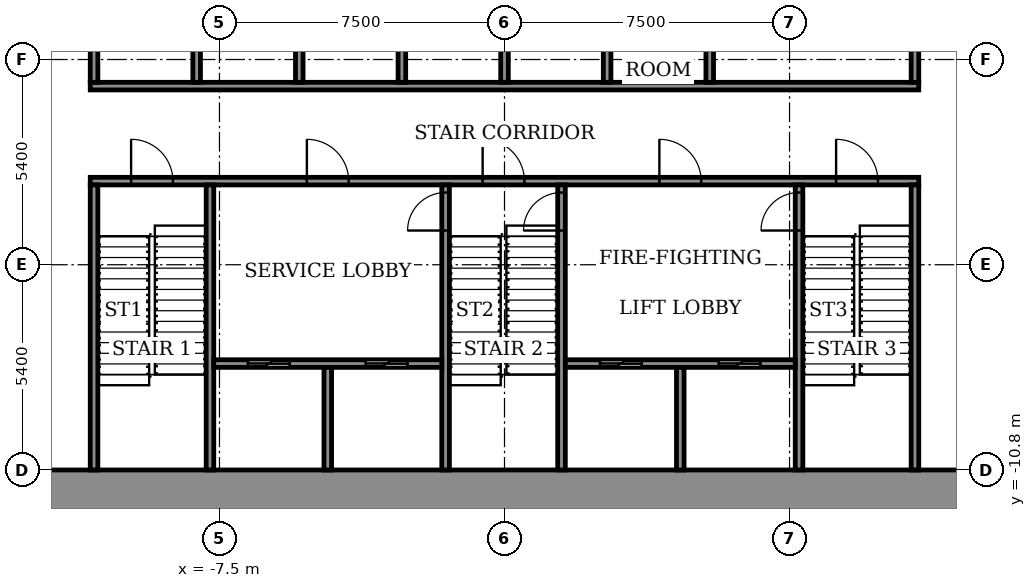
"""IFC4 building model, lengths in metres.
Left out: names, types, materials, properties, quantities, classifications, styles, units other than length and angle.
Written with IfcOpenShell. Run it as: python <this file> out.ifc"""

import sys

from ifc_helpers import new_model, si_unit, direction, frame, frame_2d, origin, place, context, subcontext, project, spatial, rectangle, extrude, element, fill, save


model = new_model("IFC4")
c1 = context("Model", 3, precision=1e-05, world=origin(), true_north=direction((0.0, 1.0)))
c2 = subcontext(c1, "Body", "Model", "MODEL_VIEW")
j1 = project(units=[si_unit("LENGTHUNIT", "METRE"), si_unit("PLANEANGLEUNIT", "RADIAN")], contexts=[c1])
p1 = place(None, origin())
s1 = spatial("IfcSite", under=j1, at=p1, CompositionType="ELEMENT")
p2 = place(p1, origin())
s2 = spatial("IfcBuilding", under=s1, at=p2, CompositionType="ELEMENT")
p3 = place(p2, frame((0.0, 0.0, 6.0)))
s3 = spatial("IfcBuildingStorey", under=s2, at=p3, CompositionType="ELEMENT", Elevation=6.0)
p4 = place(p3, frame((-15.0, -11.4, 0.0), z_axis=(0.0, 0.0, 1.0), x_axis=(1.0, 0.0, 0.0)))
e1 = element("IfcWall", 1, at=p4, inside=s3, PredefinedType="SHEAR", context=c2, shape_type="SweptSolid", body=[
    extrude(rectangle(XDim=30.0, YDim=1.2, at=frame_2d((15.0, 0.0))), origin(), (0.0, 0.0, 1.0), 5.0),
])
p5 = place(p3, frame((-10.9, -3.2, 0.0), z_axis=(0.0, 0.0, 1.0), x_axis=(1.0, 0.0, 0.0)))
e2 = element("IfcWall", 2, at=p5, inside=s3, PredefinedType="SHEAR", context=c2, shape_type="SweptSolid", body=[
    extrude(rectangle(XDim=21.8, YDim=0.2, at=frame_2d((10.9, 0.0))), origin(), (0.0, 0.0, 1.0), 4.45),
])
p6 = place(p5, frame((1.075, 0.0, 0.0)))
e3 = element("IfcOpeningElement", 3, at=p6, cuts=e2, PredefinedType="OPENING", context=c2, shape_type="SweptSolid", body=[
    extrude(rectangle(XDim=1.1, YDim=2.1, at=frame_2d((0.55, 1.05))), frame((0.0, 0.11, 0.0), z_axis=(0.0, -1.0, 0.0), x_axis=(1.0, 0.0, 0.0)), (0.0, 0.0, 1.0), 0.22),
])
p7 = place(p5, frame((10.325, 0.0, 0.0)))
e4 = element("IfcOpeningElement", 4, at=p7, cuts=e2, PredefinedType="OPENING", context=c2, shape_type="SweptSolid", body=[
    extrude(rectangle(XDim=1.1, YDim=2.1, at=frame_2d((0.55, 1.05))), frame((0.0, 0.11, 0.0), z_axis=(0.0, -1.0, 0.0), x_axis=(1.0, 0.0, 0.0)), (0.0, 0.0, 1.0), 0.22),
])
p8 = place(p5, frame((19.625, 0.0, 0.0)))
e5 = element("IfcOpeningElement", 5, at=p8, cuts=e2, PredefinedType="OPENING", context=c2, shape_type="SweptSolid", body=[
    extrude(rectangle(XDim=1.1, YDim=2.1, at=frame_2d((0.55, 1.05))), frame((0.0, 0.11, 0.0), z_axis=(0.0, -1.0, 0.0), x_axis=(1.0, 0.0, 0.0)), (0.0, 0.0, 1.0), 0.22),
])
p9 = place(p5, frame((5.7, 0.0, 0.0)))
e6 = element("IfcOpeningElement", 6, at=p9, cuts=e2, PredefinedType="OPENING", context=c2, shape_type="SweptSolid", body=[
    extrude(rectangle(XDim=1.1, YDim=2.1, at=frame_2d((0.55, 1.05))), frame((0.0, 0.11, 0.0), z_axis=(0.0, -1.0, 0.0), x_axis=(1.0, 0.0, 0.0)), (0.0, 0.0, 1.0), 0.22),
])
p10 = place(p5, frame((14.975, 0.0, 0.0)))
e7 = element("IfcOpeningElement", 7, at=p10, cuts=e2, PredefinedType="OPENING", context=c2, shape_type="SweptSolid", body=[
    extrude(rectangle(XDim=1.1, YDim=2.1, at=frame_2d((0.55, 1.05))), frame((0.0, 0.11, 0.0), z_axis=(0.0, -1.0, 0.0), x_axis=(1.0, 0.0, 0.0)), (0.0, 0.0, 1.0), 0.22),
])
p11 = place(p3, frame((-10.9, -0.7, 0.0), z_axis=(0.0, 0.0, 1.0), x_axis=(1.0, 0.0, 0.0)))
e8 = element("IfcWall", 8, at=p11, inside=s3, PredefinedType="SHEAR", context=c2, shape_type="SweptSolid", body=[
    extrude(rectangle(XDim=21.8, YDim=0.2, at=frame_2d((10.9, 0.0))), origin(), (0.0, 0.0, 1.0), 4.45),
])
for number, where, z_axis, x_axis in (
    (9, (-10.8, -10.8, 0.0), (0.0, 0.0, 1.0), (0.0, 1.0, 0.0)),
    (10, (-7.75, -10.8, 0.0), (0.0, 0.0, 1.0), (0.0, 1.0, 0.0)),
):
    element("IfcWall", number, at=place(p3, frame(where, z_axis=z_axis, x_axis=x_axis)), inside=s3, PredefinedType="SHEAR", context=c2, shape_type="SweptSolid", body=[
        extrude(rectangle(XDim=7.5, YDim=0.2, at=frame_2d((3.75, 0.0))), origin(), (0.0, 0.0, 1.0), 4.45),
    ])
p12 = place(p3, frame((-1.55, -10.8, 0.0), z_axis=(0.0, 0.0, 1.0), x_axis=(0.0, 1.0, 0.0)))
e11 = element("IfcWall", 11, at=p12, inside=s3, PredefinedType="SHEAR", context=c2, shape_type="SweptSolid", body=[
    extrude(rectangle(XDim=7.5, YDim=0.2, at=frame_2d((3.75, 0.0))), origin(), (0.0, 0.0, 1.0), 4.45),
])
p13 = place(p12, frame((6.3, 0.0, 0.0)))
e12 = element("IfcOpeningElement", 12, at=p13, cuts=e11, PredefinedType="OPENING", context=c2, shape_type="SweptSolid", body=[
    extrude(rectangle(XDim=1.0, YDim=2.1, at=frame_2d((0.5, 1.05))), frame((0.0, 0.11, 0.0), z_axis=(0.0, -1.0, 0.0), x_axis=(1.0, 0.0, 0.0)), (0.0, 0.0, 1.0), 0.22),
])
p14 = place(p3, frame((1.5, -10.8, 0.0), z_axis=(0.0, 0.0, 1.0), x_axis=(0.0, 1.0, 0.0)))
e13 = element("IfcWall", 13, at=p14, inside=s3, PredefinedType="SHEAR", context=c2, shape_type="SweptSolid", body=[
    extrude(rectangle(XDim=7.5, YDim=0.2, at=frame_2d((3.75, 0.0))), origin(), (0.0, 0.0, 1.0), 4.45),
])
p15 = place(p14, frame((6.3, 0.0, 0.0)))
e14 = element("IfcOpeningElement", 14, at=p15, cuts=e13, PredefinedType="OPENING", context=c2, shape_type="SweptSolid", body=[
    extrude(rectangle(XDim=1.0, YDim=2.1, at=frame_2d((0.5, 1.05))), frame((0.0, 0.11, 0.0), z_axis=(0.0, -1.0, 0.0), x_axis=(1.0, 0.0, 0.0)), (0.0, 0.0, 1.0), 0.22),
])
p16 = place(p3, frame((7.75, -10.8, 0.0), z_axis=(0.0, 0.0, 1.0), x_axis=(0.0, 1.0, 0.0)))
e15 = element("IfcWall", 15, at=p16, inside=s3, PredefinedType="SHEAR", context=c2, shape_type="SweptSolid", body=[
    extrude(rectangle(XDim=7.5, YDim=0.2, at=frame_2d((3.75, 0.0))), origin(), (0.0, 0.0, 1.0), 4.45),
])
p17 = place(p16, frame((6.3, 0.0, 0.0)))
e16 = element("IfcOpeningElement", 16, at=p17, cuts=e15, PredefinedType="OPENING", context=c2, shape_type="SweptSolid", body=[
    extrude(rectangle(XDim=1.0, YDim=2.1, at=frame_2d((0.5, 1.05))), frame((0.0, 0.11, 0.0), z_axis=(0.0, -1.0, 0.0), x_axis=(1.0, 0.0, 0.0)), (0.0, 0.0, 1.0), 0.22),
])
p18 = place(p3, frame((10.8, -10.8, 0.0), z_axis=(0.0, 0.0, 1.0), x_axis=(0.0, 1.0, 0.0)))
e17 = element("IfcWall", 17, at=p18, inside=s3, PredefinedType="SHEAR", context=c2, shape_type="SweptSolid", body=[
    extrude(rectangle(XDim=7.5, YDim=0.2, at=frame_2d((3.75, 0.0))), origin(), (0.0, 0.0, 1.0), 4.45),
])
p19 = place(p3, frame((-7.65, -8.0, 0.0), z_axis=(0.0, 0.0, 1.0), x_axis=(1.0, 0.0, 0.0)))
e18 = element("IfcWall", 18, at=p19, inside=s3, PredefinedType="SHEAR", context=c2, shape_type="SweptSolid", body=[
    extrude(rectangle(XDim=6.0, YDim=0.2, at=frame_2d((3.0, 0.0))), origin(), (0.0, 0.0, 1.0), 4.45),
])
p20 = place(p19, frame((0.9, 0.0, 0.0)))
e19 = element("IfcOpeningElement", 19, at=p20, cuts=e18, PredefinedType="OPENING", context=c2, shape_type="SweptSolid", body=[
    extrude(rectangle(XDim=1.1, YDim=2.1, at=frame_2d((0.55, 1.05))), frame((0.0, 0.11, 0.0), z_axis=(0.0, -1.0, 0.0), x_axis=(1.0, 0.0, 0.0)), (0.0, 0.0, 1.0), 0.22),
])
p21 = place(p19, frame((4.0, 0.0, 0.0)))
e20 = element("IfcOpeningElement", 20, at=p21, cuts=e18, PredefinedType="OPENING", context=c2, shape_type="SweptSolid", body=[
    extrude(rectangle(XDim=1.1, YDim=2.1, at=frame_2d((0.55, 1.05))), frame((0.0, 0.11, 0.0), z_axis=(0.0, -1.0, 0.0), x_axis=(1.0, 0.0, 0.0)), (0.0, 0.0, 1.0), 0.22),
])
p22 = place(p3, frame((-4.65, -10.8, 0.0), z_axis=(0.0, 0.0, 1.0), x_axis=(0.0, 1.0, 0.0)))
e21 = element("IfcWall", 21, at=p22, inside=s3, PredefinedType="SHEAR", context=c2, shape_type="SweptSolid", body=[
    extrude(rectangle(XDim=2.7, YDim=0.2, at=frame_2d((1.35, 0.0))), origin(), (0.0, 0.0, 1.0), 4.45),
])
p23 = place(p3, frame((1.6, -8.0, 0.0), z_axis=(0.0, 0.0, 1.0), x_axis=(1.0, 0.0, 0.0)))
e22 = element("IfcWall", 22, at=p23, inside=s3, PredefinedType="SHEAR", context=c2, shape_type="SweptSolid", body=[
    extrude(rectangle(XDim=6.05, YDim=0.2, at=frame_2d((3.025, 0.0))), origin(), (0.0, 0.0, 1.0), 4.45),
])
p24 = place(p23, frame((0.913, 0.0, 0.0)))
e23 = element("IfcOpeningElement", 23, at=p24, cuts=e22, PredefinedType="OPENING", context=c2, shape_type="SweptSolid", body=[
    extrude(rectangle(XDim=1.1, YDim=2.1, at=frame_2d((0.55, 1.05))), frame((0.0, 0.11, 0.0), z_axis=(0.0, -1.0, 0.0), x_axis=(1.0, 0.0, 0.0)), (0.0, 0.0, 1.0), 0.22),
])
p25 = place(p23, frame((4.038, 0.0, 0.0)))
e24 = element("IfcOpeningElement", 24, at=p25, cuts=e22, PredefinedType="OPENING", context=c2, shape_type="SweptSolid", body=[
    extrude(rectangle(XDim=1.1, YDim=2.1, at=frame_2d((0.55, 1.05))), frame((0.0, 0.11, 0.0), z_axis=(0.0, -1.0, 0.0), x_axis=(1.0, 0.0, 0.0)), (0.0, 0.0, 1.0), 0.22),
])
p26 = place(p3, frame((4.625, -10.8, 0.0), z_axis=(0.0, 0.0, 1.0), x_axis=(0.0, 1.0, 0.0)))
e25 = element("IfcWall", 25, at=p26, inside=s3, PredefinedType="SHEAR", context=c2, shape_type="SweptSolid", body=[
    extrude(rectangle(XDim=2.7, YDim=0.2, at=frame_2d((1.35, 0.0))), origin(), (0.0, 0.0, 1.0), 4.45),
])
for number, where, z_axis, x_axis in (
    (26, (-10.8, -0.6, 0.0), (0.0, 0.0, 1.0), (0.0, 1.0, 0.0)),
    (27, (-8.1, -0.6, 0.0), (0.0, 0.0, 1.0), (0.0, 1.0, 0.0)),
    (28, (-5.4, -0.6, 0.0), (0.0, 0.0, 1.0), (0.0, 1.0, 0.0)),
    (29, (-2.7, -0.6, 0.0), (0.0, 0.0, 1.0), (0.0, 1.0, 0.0)),
    (30, (0.0, -0.6, 0.0), (0.0, 0.0, 1.0), (0.0, 1.0, 0.0)),
    (31, (2.7, -0.6, 0.0), (0.0, 0.0, 1.0), (0.0, 1.0, 0.0)),
):
    element("IfcWall", number, at=place(p3, frame(where, z_axis=z_axis, x_axis=x_axis)), inside=s3, PredefinedType="SHEAR", context=c2, shape_type="SweptSolid", body=[
        extrude(rectangle(XDim=2.5, YDim=0.2, at=frame_2d((1.25, 0.0))), origin(), (0.0, 0.0, 1.0), 4.45),
    ])
for number, where, z_axis, x_axis in (
    (32, (5.4, -0.6, 0.0), (0.0, 0.0, 1.0), (0.0, 1.0, 0.0)),
    (33, (10.8, -0.6, 0.0), (0.0, 0.0, 1.0), (0.0, 1.0, 0.0)),
):
    element("IfcWall", number, at=place(p3, frame(where, z_axis=z_axis, x_axis=x_axis)), inside=s3, PredefinedType="STANDARD", context=c2, shape_type="SweptSolid", body=[
        extrude(rectangle(XDim=2.5, YDim=0.2, at=frame_2d((1.25, 0.0))), origin(), (0.0, 0.0, 1.0), 4.45),
    ])
p27 = place(p24, origin())
e34 = element("IfcDoor", 34, at=p27, inside=s3, OperationType="SLIDING_TO_LEFT", PredefinedType="DOOR", context=c2, shape_type="SweptSolid", body=[
    extrude(rectangle(XDim=1.1, YDim=2.1, at=frame_2d((0.55, 1.05))), frame((0.0, 0.025, 0.0), z_axis=(0.0, -1.0, 0.0), x_axis=(1.0, 0.0, 0.0)), (0.0, 0.0, 1.0), 0.05),
])
fill(e23, e34)
p28 = place(p20, origin())
e35 = element("IfcDoor", 35, at=p28, inside=s3, OperationType="SLIDING_TO_LEFT", PredefinedType="DOOR", context=c2, shape_type="SweptSolid", body=[
    extrude(rectangle(XDim=1.1, YDim=2.1, at=frame_2d((0.55, 1.05))), frame((0.0, 0.025, 0.0), z_axis=(0.0, -1.0, 0.0), x_axis=(1.0, 0.0, 0.0)), (0.0, 0.0, 1.0), 0.05),
])
fill(e19, e35)
p29 = place(p25, origin())
e36 = element("IfcDoor", 36, at=p29, inside=s3, OperationType="SLIDING_TO_LEFT", PredefinedType="DOOR", context=c2, shape_type="SweptSolid", body=[
    extrude(rectangle(XDim=1.1, YDim=2.1, at=frame_2d((0.55, 1.05))), frame((0.0, 0.025, 0.0), z_axis=(0.0, -1.0, 0.0), x_axis=(1.0, 0.0, 0.0)), (0.0, 0.0, 1.0), 0.05),
])
fill(e24, e36)
p30 = place(p21, origin())
e37 = element("IfcDoor", 37, at=p30, inside=s3, OperationType="SLIDING_TO_LEFT", PredefinedType="DOOR", context=c2, shape_type="SweptSolid", body=[
    extrude(rectangle(XDim=1.1, YDim=2.1, at=frame_2d((0.55, 1.05))), frame((0.0, 0.025, 0.0), z_axis=(0.0, -1.0, 0.0), x_axis=(1.0, 0.0, 0.0)), (0.0, 0.0, 1.0), 0.05),
])
fill(e20, e37)
p31 = place(p6, origin())
e38 = element("IfcDoor", 38, at=p31, inside=s3, OperationType="SINGLE_SWING_RIGHT", PredefinedType="DOOR", context=c2, shape_type="SweptSolid", body=[
    extrude(rectangle(XDim=1.1, YDim=2.1, at=frame_2d((0.55, 1.05))), frame((0.0, 0.025, 0.0), z_axis=(0.0, -1.0, 0.0), x_axis=(1.0, 0.0, 0.0)), (0.0, 0.0, 1.0), 0.05),
])
fill(e3, e38)
p32 = place(p7, origin())
e39 = element("IfcDoor", 39, at=p32, inside=s3, OperationType="SINGLE_SWING_RIGHT", PredefinedType="DOOR", context=c2, shape_type="SweptSolid", body=[
    extrude(rectangle(XDim=1.1, YDim=2.1, at=frame_2d((0.55, 1.05))), frame((0.0, 0.025, 0.0), z_axis=(0.0, -1.0, 0.0), x_axis=(1.0, 0.0, 0.0)), (0.0, 0.0, 1.0), 0.05),
])
fill(e4, e39)
p33 = place(p8, origin())
e40 = element("IfcDoor", 40, at=p33, inside=s3, OperationType="SINGLE_SWING_RIGHT", PredefinedType="DOOR", context=c2, shape_type="SweptSolid", body=[
    extrude(rectangle(XDim=1.1, YDim=2.1, at=frame_2d((0.55, 1.05))), frame((0.0, 0.025, 0.0), z_axis=(0.0, -1.0, 0.0), x_axis=(1.0, 0.0, 0.0)), (0.0, 0.0, 1.0), 0.05),
])
fill(e5, e40)
p34 = place(p9, origin())
e41 = element("IfcDoor", 41, at=p34, inside=s3, OperationType="SINGLE_SWING_LEFT", PredefinedType="DOOR", context=c2, shape_type="SweptSolid", body=[
    extrude(rectangle(XDim=1.1, YDim=2.1, at=frame_2d((0.55, 1.05))), frame((0.0, 0.025, 0.0), z_axis=(0.0, -1.0, 0.0), x_axis=(1.0, 0.0, 0.0)), (0.0, 0.0, 1.0), 0.05),
])
fill(e6, e41)
p35 = place(p10, origin())
e42 = element("IfcDoor", 42, at=p35, inside=s3, OperationType="SINGLE_SWING_LEFT", PredefinedType="DOOR", context=c2, shape_type="SweptSolid", body=[
    extrude(rectangle(XDim=1.1, YDim=2.1, at=frame_2d((0.55, 1.05))), frame((0.0, 0.025, 0.0), z_axis=(0.0, -1.0, 0.0), x_axis=(1.0, 0.0, 0.0)), (0.0, 0.0, 1.0), 0.05),
])
fill(e7, e42)
p36 = place(p13, origin())
e43 = element("IfcDoor", 43, at=p36, inside=s3, OperationType="SINGLE_SWING_RIGHT", PredefinedType="DOOR", context=c2, shape_type="SweptSolid", body=[
    extrude(rectangle(XDim=1.0, YDim=2.1, at=frame_2d((0.5, 1.05))), frame((0.0, 0.025, 0.0), z_axis=(0.0, -1.0, 0.0), x_axis=(1.0, 0.0, 0.0)), (0.0, 0.0, 1.0), 0.05),
])
fill(e12, e43)
p37 = place(p15, origin())
e44 = element("IfcDoor", 44, at=p37, inside=s3, OperationType="SINGLE_SWING_RIGHT", PredefinedType="DOOR", context=c2, shape_type="SweptSolid", body=[
    extrude(rectangle(XDim=1.0, YDim=2.1, at=frame_2d((0.5, 1.05))), frame((0.0, 0.025, 0.0), z_axis=(0.0, -1.0, 0.0), x_axis=(1.0, 0.0, 0.0)), (0.0, 0.0, 1.0), 0.05),
])
fill(e14, e44)
p38 = place(p17, origin())
e45 = element("IfcDoor", 45, at=p38, inside=s3, OperationType="SINGLE_SWING_RIGHT", PredefinedType="DOOR", context=c2, shape_type="SweptSolid", body=[
    extrude(rectangle(XDim=1.0, YDim=2.1, at=frame_2d((0.5, 1.05))), frame((0.0, 0.025, 0.0), z_axis=(0.0, -1.0, 0.0), x_axis=(1.0, 0.0, 0.0)), (0.0, 0.0, 1.0), 0.05),
])
fill(e16, e45)
save(model, sys.argv[1])
